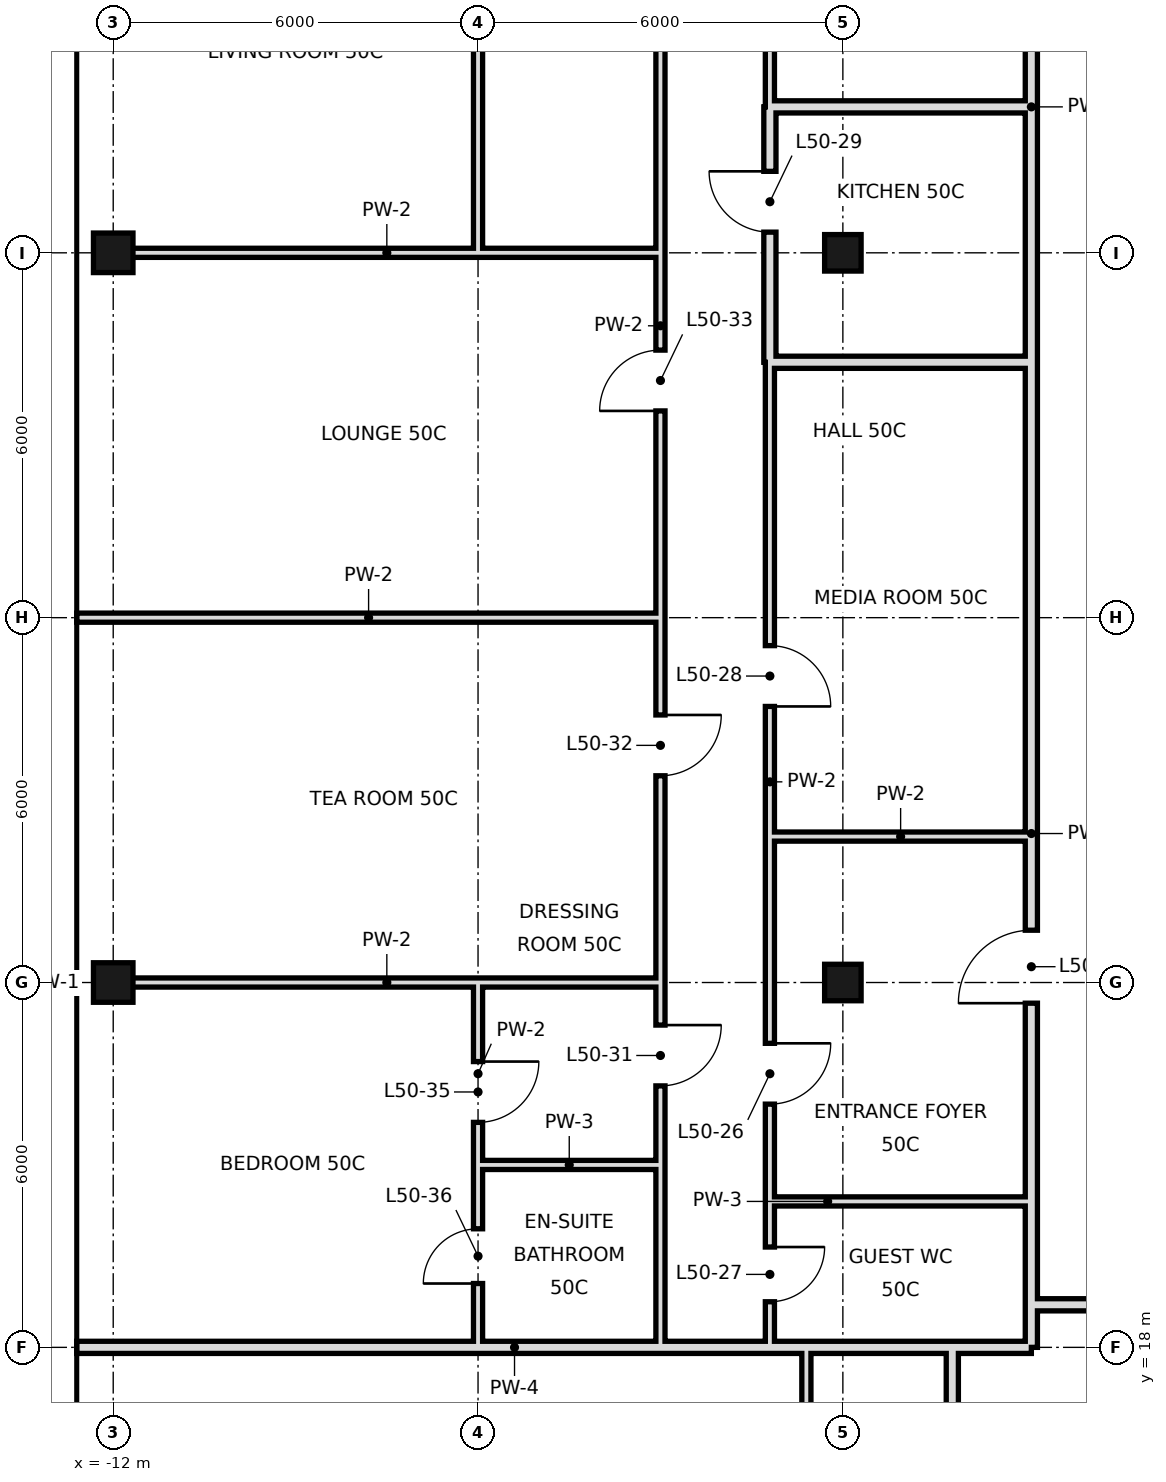
"""IFC4 building model, lengths in metres.
Left out: names, types, materials, properties, quantities, classifications, styles, units other than length and angle.
Written with IfcOpenShell. Run it as: python <this file> out.ifc"""

import sys

from ifc_helpers import new_model, si_unit, direction, frame, frame_2d, origin, origin_2d, place, context, subcontext, project, spatial, rectangle, hollow_rectangle, extrude, element, fill, save


model = new_model("IFC4")
c1 = context("Model", 3, precision=1e-05, world=origin(), true_north=direction((0.0, 1.0)))
c2 = subcontext(c1, "Body", "Model", "MODEL_VIEW")
j1 = project(units=[si_unit("LENGTHUNIT", "METRE"), si_unit("PLANEANGLEUNIT", "RADIAN")], contexts=[c1])
p1 = place(None, origin())
s1 = spatial("IfcSite", under=j1, at=p1, CompositionType="ELEMENT")
p2 = place(p1, origin())
s2 = spatial("IfcBuilding", under=s1, at=p2, CompositionType="ELEMENT")
p3 = place(p2, frame((0.0, 0.0, 215.4)))
s3 = spatial("IfcBuildingStorey", under=s2, at=p3, CompositionType="ELEMENT", Elevation=215.4)
for number, where, z_axis, x_axis in (
    (1, (-12.0, 24.0, 0.0), (0.0, 0.0, 1.0), (1.0, 0.0, 0.0)),
    (2, (-12.0, 36.0, 0.0), (0.0, 0.0, 1.0), (1.0, 0.0, 0.0)),
):
    element("IfcColumn", number, at=place(p3, frame(where, z_axis=z_axis, x_axis=x_axis)), inside=s3, PredefinedType="COLUMN", context=c2, shape_type="SweptSolid", body=[
        extrude(hollow_rectangle(XDim=0.65, YDim=0.65, WallThickness=0.032, at=origin_2d()), origin(), (0.0, 0.0, 1.0), 3.6),
    ])
for number, where, z_axis, x_axis in (
    (3, (0.0, 24.0, 0.0), (0.0, 0.0, 1.0), (1.0, 0.0, 0.0)),
    (4, (0.0, 36.0, 0.0), (0.0, 0.0, 1.0), (1.0, 0.0, 0.0)),
):
    element("IfcColumn", number, at=place(p3, frame(where, z_axis=z_axis, x_axis=x_axis)), inside=s3, PredefinedType="COLUMN", context=c2, shape_type="SweptSolid", body=[
        extrude(hollow_rectangle(XDim=0.6, YDim=0.6, WallThickness=0.028, at=origin_2d()), origin(), (0.0, 0.0, 1.0), 3.6),
    ])
p4 = place(p3, frame((-0.6, 10.8, 0.0), z_axis=(0.0, 0.0, 1.0), x_axis=(0.0, 1.0, 0.0)))
e5 = element("IfcWall", 5, at=p4, inside=s3, PredefinedType="PARTITIONING", context=c2, shape_type="SweptSolid", body=[
    extrude(rectangle(XDim=7.2, YDim=0.15, at=frame_2d((3.6, 0.0))), origin(), (0.0, 0.0, 1.0), 3.42),
])
p5 = place(p3, frame((-1.2, 34.2, 0.0), z_axis=(0.0, 0.0, 1.0), x_axis=(0.0, 1.0, 0.0)))
e6 = element("IfcWall", 6, at=p5, inside=s3, PredefinedType="SOLIDWALL", context=c2, shape_type="SweptSolid", body=[
    extrude(rectangle(XDim=4.2, YDim=0.2, at=frame_2d((2.1, 0.0))), origin(), (0.0, 0.0, 1.0), 2.72),
])
p6 = place(p5, frame((2.14, 0.0, 0.0)))
e7 = element("IfcOpeningElement", 7, at=p6, cuts=e6, PredefinedType="OPENING", context=c2, shape_type="SweptSolid", body=[
    extrude(rectangle(XDim=1.0, YDim=2.4, at=frame_2d((0.5, 1.2))), frame((0.0, 0.11, 0.0), z_axis=(0.0, -1.0, 0.0), x_axis=(1.0, 0.0, 0.0)), (0.0, 0.0, 1.0), 0.22),
])
p7 = place(p3, frame((-1.2, 20.4, 0.0), z_axis=(0.0, 0.0, 1.0), x_axis=(0.0, 1.0, 0.0)))
e8 = element("IfcWall", 8, at=p7, inside=s3, PredefinedType="PARTITIONING", context=c2, shape_type="SweptSolid", body=[
    extrude(rectangle(XDim=13.8, YDim=0.15, at=frame_2d((6.9, 0.0))), origin(), (0.0, 0.0, 1.0), 3.42),
])
p8 = place(p7, frame((1.6, 0.0, 0.0)))
e9 = element("IfcOpeningElement", 9, at=p8, cuts=e8, PredefinedType="OPENING", context=c2, shape_type="SweptSolid", body=[
    extrude(rectangle(XDim=1.0, YDim=2.4, at=frame_2d((0.5, 1.2))), frame((0.0, 0.085, 0.0), z_axis=(0.0, -1.0, 0.0), x_axis=(1.0, 0.0, 0.0)), (0.0, 0.0, 1.0), 0.17),
])
p9 = place(p7, frame((8.14, 0.0, 0.0)))
e10 = element("IfcOpeningElement", 10, at=p9, cuts=e8, PredefinedType="OPENING", context=c2, shape_type="SweptSolid", body=[
    extrude(rectangle(XDim=1.0, YDim=2.4, at=frame_2d((0.5, 1.2))), frame((0.0, 0.085, 0.0), z_axis=(0.0, -1.0, 0.0), x_axis=(1.0, 0.0, 0.0)), (0.0, 0.0, 1.0), 0.17),
])
p10 = place(p3, frame((-1.2, 38.4, 0.0), z_axis=(0.0, 0.0, 1.0), x_axis=(0.0, 1.0, 0.0)))
e11 = element("IfcWall", 11, at=p10, inside=s3, PredefinedType="PARTITIONING", context=c2, shape_type="SweptSolid", body=[
    extrude(rectangle(XDim=10.2, YDim=0.15, at=frame_2d((5.1, 0.0))), origin(), (0.0, 0.0, 1.0), 3.42),
])
p11 = place(p10, frame((5.92, 0.0, 0.0)))
e12 = element("IfcOpeningElement", 12, at=p11, cuts=e11, PredefinedType="OPENING", context=c2, shape_type="SweptSolid", body=[
    extrude(rectangle(XDim=1.0, YDim=2.4, at=frame_2d((0.5, 1.2))), frame((0.0, 0.085, 0.0), z_axis=(0.0, -1.0, 0.0), x_axis=(1.0, 0.0, 0.0)), (0.0, 0.0, 1.0), 0.17),
])
p12 = place(p3, frame((-1.2, 18.0, 0.0), z_axis=(0.0, 0.0, 1.0), x_axis=(0.0, 1.0, 0.0)))
e13 = element("IfcWall", 13, at=p12, inside=s3, PredefinedType="PARTITIONING", context=c2, shape_type="SweptSolid", body=[
    extrude(rectangle(XDim=2.4, YDim=0.15, at=frame_2d((1.2, 0.0))), origin(), (0.0, 0.0, 1.0), 3.42),
])
p13 = place(p12, frame((0.75, 0.0, 0.0)))
e14 = element("IfcOpeningElement", 14, at=p13, cuts=e13, PredefinedType="OPENING", context=c2, shape_type="SweptSolid", body=[
    extrude(rectangle(XDim=0.9, YDim=2.4, at=frame_2d((0.45, 1.2))), frame((0.0, 0.085, 0.0), z_axis=(0.0, -1.0, 0.0), x_axis=(1.0, 0.0, 0.0)), (0.0, 0.0, 1.0), 0.17),
])
p14 = place(p3, frame((-3.0, 21.0, 0.0), z_axis=(0.0, 0.0, 1.0), x_axis=(0.0, 1.0, 0.0)))
e15 = element("IfcWall", 15, at=p14, inside=s3, PredefinedType="PARTITIONING", context=c2, shape_type="SweptSolid", body=[
    extrude(rectangle(XDim=27.6, YDim=0.15, at=frame_2d((13.8, 0.0))), origin(), (0.0, 0.0, 1.0), 3.42),
])
p15 = place(p14, frame((1.3, 0.0, 0.0)))
e16 = element("IfcOpeningElement", 16, at=p15, cuts=e15, PredefinedType="OPENING", context=c2, shape_type="SweptSolid", body=[
    extrude(rectangle(XDim=1.0, YDim=2.4, at=frame_2d((0.5, 1.2))), frame((0.0, 0.085, 0.0), z_axis=(0.0, -1.0, 0.0), x_axis=(1.0, 0.0, 0.0)), (0.0, 0.0, 1.0), 0.17),
])
p16 = place(p14, frame((6.4, 0.0, 0.0)))
e17 = element("IfcOpeningElement", 17, at=p16, cuts=e15, PredefinedType="OPENING", context=c2, shape_type="SweptSolid", body=[
    extrude(rectangle(XDim=1.0, YDim=2.4, at=frame_2d((0.5, 1.2))), frame((0.0, 0.085, 0.0), z_axis=(0.0, -1.0, 0.0), x_axis=(1.0, 0.0, 0.0)), (0.0, 0.0, 1.0), 0.17),
])
p17 = place(p14, frame((12.4, 0.0, 0.0)))
e18 = element("IfcOpeningElement", 18, at=p17, cuts=e15, PredefinedType="OPENING", context=c2, shape_type="SweptSolid", body=[
    extrude(rectangle(XDim=1.0, YDim=2.4, at=frame_2d((0.5, 1.2))), frame((0.0, 0.085, 0.0), z_axis=(0.0, -1.0, 0.0), x_axis=(1.0, 0.0, 0.0)), (0.0, 0.0, 1.0), 0.17),
])
p18 = place(p14, frame((20.1, 0.0, 0.0)))
e19 = element("IfcOpeningElement", 19, at=p18, cuts=e15, PredefinedType="OPENING", context=c2, shape_type="SweptSolid", body=[
    extrude(rectangle(XDim=1.8, YDim=2.4, at=frame_2d((0.9, 1.2))), frame((0.0, 0.085, 0.0), z_axis=(0.0, -1.0, 0.0), x_axis=(1.0, 0.0, 0.0)), (0.0, 0.0, 1.0), 0.17),
])
p19 = place(p3, frame((-3.0, 18.0, 0.0), z_axis=(0.0, 0.0, 1.0), x_axis=(0.0, 1.0, 0.0)))
e20 = element("IfcWall", 20, at=p19, inside=s3, PredefinedType="PARTITIONING", context=c2, shape_type="SweptSolid", body=[
    extrude(rectangle(XDim=3.0, YDim=0.15, at=frame_2d((1.5, 0.0))), origin(), (0.0, 0.0, 1.0), 3.42),
])
p20 = place(p3, frame((-6.0, 21.0, 0.0), z_axis=(0.0, 0.0, 1.0), x_axis=(0.0, 1.0, 0.0)))
e21 = element("IfcWall", 21, at=p20, inside=s3, PredefinedType="PARTITIONING", context=c2, shape_type="SweptSolid", body=[
    extrude(rectangle(XDim=3.0, YDim=0.15, at=frame_2d((1.5, 0.0))), origin(), (0.0, 0.0, 1.0), 3.42),
])
p21 = place(p20, frame((0.7, 0.0, 0.0)))
e22 = element("IfcOpeningElement", 22, at=p21, cuts=e21, PredefinedType="OPENING", context=c2, shape_type="SweptSolid", body=[
    extrude(rectangle(XDim=1.0, YDim=2.4, at=frame_2d((0.5, 1.2))), frame((0.0, 0.085, 0.0), z_axis=(0.0, -1.0, 0.0), x_axis=(1.0, 0.0, 0.0)), (0.0, 0.0, 1.0), 0.17),
])
p22 = place(p3, frame((-6.0, 36.0, 0.0), z_axis=(0.0, 0.0, 1.0), x_axis=(0.0, 1.0, 0.0)))
e23 = element("IfcWall", 23, at=p22, inside=s3, PredefinedType="PARTITIONING", context=c2, shape_type="SweptSolid", body=[
    extrude(rectangle(XDim=12.0, YDim=0.15, at=frame_2d((6.0, 0.0))), origin(), (0.0, 0.0, 1.0), 3.42),
])
p23 = place(p22, frame((7.04, 0.0, 0.0)))
e24 = element("IfcOpeningElement", 24, at=p23, cuts=e23, PredefinedType="OPENING", context=c2, shape_type="SweptSolid", body=[
    extrude(rectangle(XDim=1.8, YDim=2.4, at=frame_2d((0.9, 1.2))), frame((0.0, 0.085, 0.0), z_axis=(0.0, -1.0, 0.0), x_axis=(1.0, 0.0, 0.0)), (0.0, 0.0, 1.0), 0.17),
])
p24 = place(p3, frame((-6.0, 18.0, 0.0), z_axis=(0.0, 0.0, 1.0), x_axis=(0.0, 1.0, 0.0)))
e25 = element("IfcWall", 25, at=p24, inside=s3, PredefinedType="PARTITIONING", context=c2, shape_type="SweptSolid", body=[
    extrude(rectangle(XDim=3.0, YDim=0.15, at=frame_2d((1.5, 0.0))), origin(), (0.0, 0.0, 1.0), 3.42),
])
p25 = place(p24, frame((1.05, 0.0, 0.0)))
e26 = element("IfcOpeningElement", 26, at=p25, cuts=e25, PredefinedType="OPENING", context=c2, shape_type="SweptSolid", body=[
    extrude(rectangle(XDim=0.9, YDim=2.4, at=frame_2d((0.45, 1.2))), frame((0.0, 0.085, 0.0), z_axis=(0.0, -1.0, 0.0), x_axis=(1.0, 0.0, 0.0)), (0.0, 0.0, 1.0), 0.17),
])
p26 = place(p3, frame((1.8, 10.8, 0.0), z_axis=(0.0, 0.0, 1.0), x_axis=(0.0, 1.0, 0.0)))
e27 = element("IfcWall", 27, at=p26, inside=s3, PredefinedType="SOLIDWALL", context=c2, shape_type="SweptSolid", body=[
    extrude(rectangle(XDim=7.2, YDim=0.2, at=frame_2d((3.6, 0.0))), origin(), (0.0, 0.0, 1.0), 3.42),
])
p27 = place(p3, frame((3.1, 18.7, 0.0), z_axis=(0.0, 0.0, 1.0), x_axis=(0.0, 1.0, 0.0)))
e28 = element("IfcWall", 28, at=p27, inside=s3, PredefinedType="SOLIDWALL", context=c2, shape_type="SweptSolid", body=[
    extrude(rectangle(XDim=15.5, YDim=0.2, at=frame_2d((7.75, 0.0))), origin(), (0.0, 0.0, 1.0), 2.97),
])
p28 = place(p27, frame((4.96, 0.0, 0.0)))
e29 = element("IfcOpeningElement", 29, at=p28, cuts=e28, PredefinedType="OPENING", context=c2, shape_type="SweptSolid", body=[
    extrude(rectangle(XDim=1.2, YDim=2.4, at=frame_2d((0.6, 1.2))), frame((0.0, 0.11, 0.0), z_axis=(0.0, -1.0, 0.0), x_axis=(1.0, 0.0, 0.0)), (0.0, 0.0, 1.0), 0.22),
])
p29 = place(p3, frame((3.1, 38.4, 0.0), z_axis=(0.0, 0.0, 1.0), x_axis=(0.0, 1.0, 0.0)))
e30 = element("IfcWall", 30, at=p29, inside=s3, PredefinedType="SOLIDWALL", context=c2, shape_type="SweptSolid", body=[
    extrude(rectangle(XDim=10.2, YDim=0.2, at=frame_2d((5.1, 0.0))), origin(), (0.0, 0.0, 1.0), 2.72),
])
p30 = place(p3, frame((3.1, 18.0, 0.0), z_axis=(0.0, 0.0, 1.0), x_axis=(0.0, 1.0, 0.0)))
e31 = element("IfcWall", 31, at=p30, inside=s3, PredefinedType="SOLIDWALL", context=c2, shape_type="SweptSolid", body=[
    extrude(rectangle(XDim=0.7, YDim=0.2, at=frame_2d((0.35, 0.0))), origin(), (0.0, 0.0, 1.0), 2.97),
])
p31 = place(p3, frame((3.1, 34.2, 0.0), z_axis=(0.0, 0.0, 1.0), x_axis=(0.0, 1.0, 0.0)))
e32 = element("IfcWall", 32, at=p31, inside=s3, PredefinedType="SOLIDWALL", context=c2, shape_type="SweptSolid", body=[
    extrude(rectangle(XDim=4.2, YDim=0.2, at=frame_2d((2.1, 0.0))), origin(), (0.0, 0.0, 1.0), 3.42),
])
p32 = place(p3, frame((1.8, 18.0, 0.0), z_axis=(0.0, 0.0, 1.0), x_axis=(1.0, 0.0, 0.0)))
e33 = element("IfcWall", 33, at=p32, inside=s3, PredefinedType="SOLIDWALL", context=c2, shape_type="SweptSolid", body=[
    extrude(rectangle(XDim=1.3, YDim=0.2, at=frame_2d((0.65, 0.0))), origin(), (0.0, 0.0, 1.0), 2.97),
])
p33 = place(p3, frame((-12.6, 18.0, 0.0), z_axis=(0.0, 0.0, 1.0), x_axis=(1.0, 0.0, 0.0)))
e34 = element("IfcWall", 34, at=p33, inside=s3, PredefinedType="SOLIDWALL", context=c2, shape_type="SweptSolid", body=[
    extrude(rectangle(XDim=14.4, YDim=0.2, at=frame_2d((7.2, 0.0))), origin(), (0.0, 0.0, 1.0), 2.72),
])
p34 = place(p3, frame((3.1, 18.7, 0.0), z_axis=(0.0, 0.0, 1.0), x_axis=(1.0, 0.0, 0.0)))
e35 = element("IfcWall", 35, at=p34, inside=s3, PredefinedType="SOLIDWALL", context=c2, shape_type="SweptSolid", body=[
    extrude(rectangle(XDim=4.1, YDim=0.2, at=frame_2d((2.05, 0.0))), origin(), (0.0, 0.0, 1.0), 2.72),
])
p35 = place(p3, frame((-1.2, 20.4, 0.0), z_axis=(0.0, 0.0, 1.0), x_axis=(1.0, 0.0, 0.0)))
e36 = element("IfcWall", 36, at=p35, inside=s3, PredefinedType="PARTITIONING", context=c2, shape_type="SweptSolid", body=[
    extrude(rectangle(XDim=4.3, YDim=0.15, at=frame_2d((2.15, 0.0))), origin(), (0.0, 0.0, 1.0), 3.42),
])
p36 = place(p3, frame((-6.0, 21.0, 0.0), z_axis=(0.0, 0.0, 1.0), x_axis=(1.0, 0.0, 0.0)))
e37 = element("IfcWall", 37, at=p36, inside=s3, PredefinedType="PARTITIONING", context=c2, shape_type="SweptSolid", body=[
    extrude(rectangle(XDim=3.0, YDim=0.15, at=frame_2d((1.5, 0.0))), origin(), (0.0, 0.0, 1.0), 3.42),
])
p37 = place(p3, frame((-12.0, 24.0, 0.0), z_axis=(0.0, 0.0, 1.0), x_axis=(1.0, 0.0, 0.0)))
e38 = element("IfcWall", 38, at=p37, inside=s3, PredefinedType="PARTITIONING", context=c2, shape_type="SweptSolid", body=[
    extrude(rectangle(XDim=9.0, YDim=0.15, at=frame_2d((4.5, 0.0))), origin(), (0.0, 0.0, 1.0), 2.72),
])
p38 = place(p3, frame((-1.2, 26.4, 0.0), z_axis=(0.0, 0.0, 1.0), x_axis=(1.0, 0.0, 0.0)))
e39 = element("IfcWall", 39, at=p38, inside=s3, PredefinedType="PARTITIONING", context=c2, shape_type="SweptSolid", body=[
    extrude(rectangle(XDim=4.3, YDim=0.15, at=frame_2d((2.15, 0.0))), origin(), (0.0, 0.0, 1.0), 3.42),
])
p39 = place(p3, frame((-12.6, 30.0, 0.0), z_axis=(0.0, 0.0, 1.0), x_axis=(1.0, 0.0, 0.0)))
e40 = element("IfcWall", 40, at=p39, inside=s3, PredefinedType="PARTITIONING", context=c2, shape_type="SweptSolid", body=[
    extrude(rectangle(XDim=9.6, YDim=0.15, at=frame_2d((4.8, 0.0))), origin(), (0.0, 0.0, 1.0), 2.72),
])
p40 = place(p3, frame((-1.2, 34.2, 0.0), z_axis=(0.0, 0.0, 1.0), x_axis=(1.0, 0.0, 0.0)))
e41 = element("IfcWall", 41, at=p40, inside=s3, PredefinedType="SOLIDWALL", context=c2, shape_type="SweptSolid", body=[
    extrude(rectangle(XDim=4.3, YDim=0.2, at=frame_2d((2.15, 0.0))), origin(), (0.0, 0.0, 1.0), 2.72),
])
p41 = place(p3, frame((-12.0, 36.0, 0.0), z_axis=(0.0, 0.0, 1.0), x_axis=(1.0, 0.0, 0.0)))
e42 = element("IfcWall", 42, at=p41, inside=s3, PredefinedType="PARTITIONING", context=c2, shape_type="SweptSolid", body=[
    extrude(rectangle(XDim=9.0, YDim=0.15, at=frame_2d((4.5, 0.0))), origin(), (0.0, 0.0, 1.0), 2.72),
])
p42 = place(p3, frame((-1.2, 38.4, 0.0), z_axis=(0.0, 0.0, 1.0), x_axis=(1.0, 0.0, 0.0)))
e43 = element("IfcWall", 43, at=p42, inside=s3, PredefinedType="SOLIDWALL", context=c2, shape_type="SweptSolid", body=[
    extrude(rectangle(XDim=4.3, YDim=0.2, at=frame_2d((2.15, 0.0))), origin(), (0.0, 0.0, 1.0), 2.72),
])
p43 = place(p8, origin())
e44 = element("IfcDoor", 44, at=p43, inside=s3, OperationType="SINGLE_SWING_RIGHT", PredefinedType="DOOR", context=c2, shape_type="SweptSolid", body=[
    extrude(rectangle(XDim=1.0, YDim=2.4, at=frame_2d((0.5, 1.2))), frame((0.0, 0.025, 0.0), z_axis=(0.0, -1.0, 0.0), x_axis=(1.0, 0.0, 0.0)), (0.0, 0.0, 1.0), 0.05),
])
fill(e9, e44)
p44 = place(p13, origin())
e45 = element("IfcDoor", 45, at=p44, inside=s3, OperationType="SINGLE_SWING_RIGHT", PredefinedType="DOOR", context=c2, shape_type="SweptSolid", body=[
    extrude(rectangle(XDim=0.9, YDim=2.4, at=frame_2d((0.45, 1.2))), frame((0.0, 0.025, 0.0), z_axis=(0.0, -1.0, 0.0), x_axis=(1.0, 0.0, 0.0)), (0.0, 0.0, 1.0), 0.05),
])
fill(e14, e45)
p45 = place(p9, frame((1.0, 0.0, 0.0), z_axis=(0.0, 0.0, 1.0), x_axis=(-1.0, 0.0, 0.0)))
e46 = element("IfcDoor", 46, at=p45, inside=s3, OperationType="SINGLE_SWING_RIGHT", PredefinedType="DOOR", context=c2, shape_type="SweptSolid", body=[
    extrude(rectangle(XDim=1.0, YDim=2.4, at=frame_2d((0.5, 1.2))), frame((0.0, 0.025, 0.0), z_axis=(0.0, -1.0, 0.0), x_axis=(1.0, 0.0, 0.0)), (0.0, 0.0, 1.0), 0.05),
])
fill(e10, e46)
p46 = place(p6, frame((1.0, 0.0, 0.0), z_axis=(0.0, 0.0, 1.0), x_axis=(-1.0, 0.0, 0.0)))
e47 = element("IfcDoor", 47, at=p46, inside=s3, OperationType="SINGLE_SWING_LEFT", PredefinedType="DOOR", context=c2, shape_type="SweptSolid", body=[
    extrude(rectangle(XDim=1.0, YDim=2.4, at=frame_2d((0.5, 1.2))), frame((0.0, 0.025, 0.0), z_axis=(0.0, -1.0, 0.0), x_axis=(1.0, 0.0, 0.0)), (0.0, 0.0, 1.0), 0.05),
])
fill(e7, e47)
p47 = place(p15, origin())
e48 = element("IfcDoor", 48, at=p47, inside=s3, OperationType="SINGLE_SWING_RIGHT", PredefinedType="DOOR", context=c2, shape_type="SweptSolid", body=[
    extrude(rectangle(XDim=1.0, YDim=2.4, at=frame_2d((0.5, 1.2))), frame((0.0, 0.025, 0.0), z_axis=(0.0, -1.0, 0.0), x_axis=(1.0, 0.0, 0.0)), (0.0, 0.0, 1.0), 0.05),
])
fill(e16, e48)
p48 = place(p16, origin())
e49 = element("IfcDoor", 49, at=p48, inside=s3, OperationType="SINGLE_SWING_RIGHT", PredefinedType="DOOR", context=c2, shape_type="SweptSolid", body=[
    extrude(rectangle(XDim=1.0, YDim=2.4, at=frame_2d((0.5, 1.2))), frame((0.0, 0.025, 0.0), z_axis=(0.0, -1.0, 0.0), x_axis=(1.0, 0.0, 0.0)), (0.0, 0.0, 1.0), 0.05),
])
fill(e17, e49)
p49 = place(p17, origin())
e50 = element("IfcDoor", 50, at=p49, inside=s3, OperationType="SINGLE_SWING_LEFT", PredefinedType="DOOR", context=c2, shape_type="SweptSolid", body=[
    extrude(rectangle(XDim=1.0, YDim=2.4, at=frame_2d((0.5, 1.2))), frame((0.0, 0.025, 0.0), z_axis=(0.0, -1.0, 0.0), x_axis=(1.0, 0.0, 0.0)), (0.0, 0.0, 1.0), 0.05),
])
fill(e18, e50)
p50 = place(p21, origin())
e51 = element("IfcDoor", 51, at=p50, inside=s3, OperationType="SINGLE_SWING_RIGHT", PredefinedType="DOOR", context=c2, shape_type="SweptSolid", body=[
    extrude(rectangle(XDim=1.0, YDim=2.4, at=frame_2d((0.5, 1.2))), frame((0.0, 0.025, 0.0), z_axis=(0.0, -1.0, 0.0), x_axis=(1.0, 0.0, 0.0)), (0.0, 0.0, 1.0), 0.05),
])
fill(e22, e51)
p51 = place(p25, origin())
e52 = element("IfcDoor", 52, at=p51, inside=s3, OperationType="SINGLE_SWING_LEFT", PredefinedType="DOOR", context=c2, shape_type="SweptSolid", body=[
    extrude(rectangle(XDim=0.9, YDim=2.4, at=frame_2d((0.45, 1.2))), frame((0.0, 0.025, 0.0), z_axis=(0.0, -1.0, 0.0), x_axis=(1.0, 0.0, 0.0)), (0.0, 0.0, 1.0), 0.05),
])
fill(e26, e52)
p52 = place(p28, origin())
e53 = element("IfcDoor", 53, at=p52, inside=s3, OperationType="SINGLE_SWING_LEFT", PredefinedType="DOOR", context=c2, shape_type="SweptSolid", body=[
    extrude(rectangle(XDim=1.2, YDim=2.4, at=frame_2d((0.6, 1.2))), frame((0.0, 0.025, 0.0), z_axis=(0.0, -1.0, 0.0), x_axis=(1.0, 0.0, 0.0)), (0.0, 0.0, 1.0), 0.05),
])
fill(e29, e53)
save(model, sys.argv[1])
